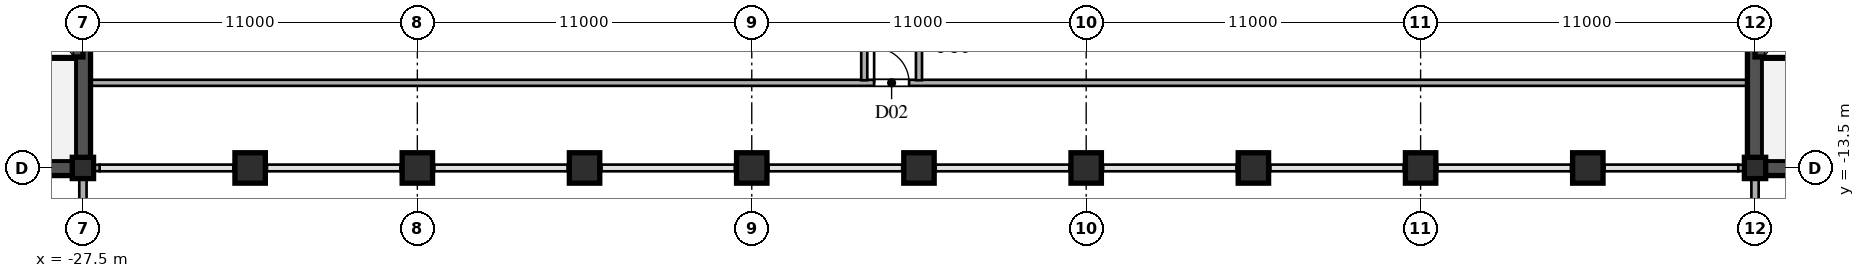
"""IFC4 building model, lengths in metres.
Left out: names, types, materials, properties, quantities, classifications, styles, units other than length and angle.
Written with IfcOpenShell. Run it as: python <this file> out.ifc"""

import sys

from ifc_helpers import new_model, si_unit, direction, frame, frame_2d, origin, origin_2d, place, context, subcontext, project, spatial, rectangle, hollow_rectangle, extrude, source, transform, mapped, element, fill, save


model = new_model("IFC4")
c1 = context("Model", 3, precision=1e-05, world=origin(), true_north=direction((0.0, 1.0)))
c2 = subcontext(c1, "Body", "Model", "MODEL_VIEW")
j1 = project(units=[si_unit("LENGTHUNIT", "METRE"), si_unit("PLANEANGLEUNIT", "RADIAN")], contexts=[c1])
p1 = place(None, origin())
s1 = spatial("IfcSite", under=j1, at=p1, CompositionType="ELEMENT")
p2 = place(p1, origin())
s2 = spatial("IfcBuilding", under=s1, at=p2, CompositionType="ELEMENT")
p3 = place(p2, frame((0.0, 0.0, 229.8)))
s3 = spatial("IfcBuildingStorey", under=s2, at=p3, CompositionType="ELEMENT", Elevation=229.8)
m1 = source(origin(), c2, "Body", "SweptSolid", [
    extrude(hollow_rectangle(XDim=0.7, YDim=0.7, WallThickness=0.03, at=origin_2d()), origin(), (0.0, 0.0, 1.0), 4.8),
])
for number, where, z_axis, x_axis in (
    (1, (-27.5, -13.5, 0.0), (0.0, 0.0, 1.0), (1.0, 0.0, 0.0)),
    (2, (27.5, -13.5, 0.0), (0.0, 0.0, 1.0), (1.0, 0.0, 0.0)),
):
    element("IfcColumn", number, at=place(p3, frame(where, z_axis=z_axis, x_axis=x_axis)), inside=s3, PredefinedType="COLUMN", context=c2, shape_type="MappedRepresentation", body=[
        mapped(m1, transform((0.0, 0.0, 0.0), scale=1.0)),
    ])
m2 = source(origin(), c2, "Body", "SweptSolid", [
    extrude(hollow_rectangle(XDim=1.0, YDim=1.0, WallThickness=0.042, at=origin_2d()), origin(), (0.0, 0.0, 1.0), 6.06),
])
for number, where, z_axis, x_axis in (
    (3, (-22.0, -13.5, -1.26), (0.0, 0.0, 1.0), (1.0, 0.0, 0.0)),
    (4, (-16.5, -13.5, -1.26), (0.0, 0.0, 1.0), (1.0, 0.0, 0.0)),
    (5, (-11.0, -13.5, -1.26), (0.0, 0.0, 1.0), (1.0, 0.0, 0.0)),
    (6, (-5.5, -13.5, -1.26), (0.0, 0.0, 1.0), (1.0, 0.0, 0.0)),
    (7, (0.0, -13.5, -1.26), (0.0, 0.0, 1.0), (1.0, 0.0, 0.0)),
    (8, (5.5, -13.5, -1.26), (0.0, 0.0, 1.0), (1.0, 0.0, 0.0)),
    (9, (11.0, -13.5, -1.26), (0.0, 0.0, 1.0), (1.0, 0.0, 0.0)),
    (10, (16.5, -13.5, -1.26), (0.0, 0.0, 1.0), (1.0, 0.0, 0.0)),
    (11, (22.0, -13.5, -1.26), (0.0, 0.0, 1.0), (1.0, 0.0, 0.0)),
):
    element("IfcColumn", number, at=place(p3, frame(where, z_axis=z_axis, x_axis=x_axis)), inside=s3, PredefinedType="COLUMN", context=c2, shape_type="MappedRepresentation", body=[
        mapped(m2, transform((0.0, 0.0, 0.0), scale=1.0)),
    ])
p4 = place(p3, frame((-27.5, -15.98, 0.0), z_axis=(0.0, 0.0, 1.0), x_axis=(0.0, 1.0, 0.0)))
e12 = element("IfcWall", 12, at=p4, inside=s3, PredefinedType="SOLIDWALL", context=c2, shape_type="SweptSolid", body=[
    extrude(rectangle(XDim=1.605, YDim=0.24, at=frame_2d((0.803, 0.0))), origin(), (0.0, 0.0, 1.0), 4.54),
])
p5 = place(p3, frame((-27.5, -14.375, 0.0), z_axis=(0.0, 0.0, 1.0), x_axis=(0.0, 1.0, 0.0)))
e13 = element("IfcWall", 13, at=p5, inside=s3, PredefinedType="SOLIDWALL", context=c2, shape_type="SweptSolid", body=[
    extrude(rectangle(XDim=0.62, YDim=0.24, at=frame_2d((0.31, 0.0))), origin(), (0.0, 0.0, 1.0), 4.04),
])
p6 = place(p3, frame((27.5, -15.98, 0.0), z_axis=(0.0, 0.0, 1.0), x_axis=(0.0, 1.0, 0.0)))
e14 = element("IfcWall", 14, at=p6, inside=s3, PredefinedType="SOLIDWALL", context=c2, shape_type="SweptSolid", body=[
    extrude(rectangle(XDim=1.605, YDim=0.24, at=frame_2d((0.803, 0.0))), origin(), (0.0, 0.0, 1.0), 4.54),
])
p7 = place(p3, frame((27.5, -14.375, 0.0), z_axis=(0.0, 0.0, 1.0), x_axis=(0.0, 1.0, 0.0)))
e15 = element("IfcWall", 15, at=p7, inside=s3, PredefinedType="SOLIDWALL", context=c2, shape_type="SweptSolid", body=[
    extrude(rectangle(XDim=0.62, YDim=0.24, at=frame_2d((0.31, 0.0))), origin(), (0.0, 0.0, 1.0), 4.04),
])
p8 = place(p3, frame((-27.49, -13.5, 0.0), z_axis=(0.0, 0.0, 1.0), x_axis=(1.0, 0.0, 0.0)))
e16 = element("IfcWall", 16, at=p8, inside=s3, PredefinedType="SOLIDWALL", context=c2, shape_type="SweptSolid", body=[
    extrude(rectangle(XDim=0.54, YDim=0.21, at=frame_2d((0.27, 0.0))), origin(), (0.0, 0.0, 1.0), 2.54),
])
for number, where, z_axis, x_axis in (
    (17, (-22.55, -13.5, 0.0), (0.0, 0.0, 1.0), (1.0, 0.0, 0.0)),
    (18, (-17.05, -13.5, 0.0), (0.0, 0.0, 1.0), (1.0, 0.0, 0.0)),
    (19, (-11.55, -13.5, 0.0), (0.0, 0.0, 1.0), (1.0, 0.0, 0.0)),
    (20, (-6.05, -13.5, 0.0), (0.0, 0.0, 1.0), (1.0, 0.0, 0.0)),
    (21, (-0.55, -13.5, 0.0), (0.0, 0.0, 1.0), (1.0, 0.0, 0.0)),
    (22, (4.95, -13.5, 0.0), (0.0, 0.0, 1.0), (1.0, 0.0, 0.0)),
    (23, (10.45, -13.5, 0.0), (0.0, 0.0, 1.0), (1.0, 0.0, 0.0)),
    (24, (15.95, -13.5, 0.0), (0.0, 0.0, 1.0), (1.0, 0.0, 0.0)),
    (25, (21.45, -13.5, 0.0), (0.0, 0.0, 1.0), (1.0, 0.0, 0.0)),
):
    element("IfcWall", number, at=place(p3, frame(where, z_axis=z_axis, x_axis=x_axis)), inside=s3, PredefinedType="SOLIDWALL", context=c2, shape_type="SweptSolid", body=[
        extrude(rectangle(XDim=1.1, YDim=0.21, at=frame_2d((0.55, 0.0))), origin(), (0.0, 0.0, 1.0), 2.54),
    ])
p9 = place(p3, frame((26.95, -13.5, 0.0), z_axis=(0.0, 0.0, 1.0), x_axis=(1.0, 0.0, 0.0)))
e26 = element("IfcWall", 26, at=p9, inside=s3, PredefinedType="SOLIDWALL", context=c2, shape_type="SweptSolid", body=[
    extrude(rectangle(XDim=0.54, YDim=0.21, at=frame_2d((0.27, 0.0))), origin(), (0.0, 0.0, 1.0), 2.54),
])
p10 = place(p3, frame((-27.5, -13.5, 0.0), z_axis=(0.0, 0.0, 1.0), x_axis=(0.0, 1.0, 0.0)))
e27 = element("IfcWall", 27, at=p10, inside=s3, PredefinedType="SHEAR", context=c2, shape_type="SweptSolid", body=[
    extrude(rectangle(XDim=12.2, YDim=0.5, at=frame_2d((6.1, 0.0))), origin(), (0.0, 0.0, 1.0), 4.54),
])
p11 = place(p3, frame((-36.5, -13.5, 0.0), z_axis=(0.0, 0.0, 1.0), x_axis=(1.0, 0.0, 0.0)))
e28 = element("IfcWall", 28, at=p11, inside=s3, PredefinedType="SHEAR", context=c2, shape_type="SweptSolid", body=[
    extrude(rectangle(XDim=9.0, YDim=0.5, at=frame_2d((4.5, 0.0))), origin(), (0.0, 0.0, 1.0), 4.54),
])
p12 = place(p3, frame((-36.5, -9.7, 0.0), z_axis=(0.0, 0.0, 1.0), x_axis=(1.0, 0.0, 0.0)))
e29 = element("IfcWall", 29, at=p12, inside=s3, PredefinedType="SHEAR", context=c2, shape_type="SweptSolid", body=[
    extrude(rectangle(XDim=9.0, YDim=0.3, at=frame_2d((4.5, 0.0))), origin(), (0.0, 0.0, 1.0), 4.54),
])
p13 = place(p12, frame((0.6, 0.0, 0.0)))
e30 = element("IfcOpeningElement", 30, at=p13, cuts=e29, PredefinedType="OPENING", context=c2, shape_type="SweptSolid", body=[
    extrude(rectangle(XDim=1.1, YDim=2.2, at=frame_2d((0.55, 1.1))), frame((0.0, 0.16, 0.0), z_axis=(0.0, -1.0, 0.0), x_axis=(1.0, 0.0, 0.0)), (0.0, 0.0, 1.0), 0.32),
])
p14 = place(p3, frame((27.5, -13.5, 0.0), z_axis=(0.0, 0.0, 1.0), x_axis=(0.0, 1.0, 0.0)))
e31 = element("IfcWall", 31, at=p14, inside=s3, PredefinedType="SHEAR", context=c2, shape_type="SweptSolid", body=[
    extrude(rectangle(XDim=12.2, YDim=0.5, at=frame_2d((6.1, 0.0))), origin(), (0.0, 0.0, 1.0), 4.54),
])
p15 = place(p3, frame((27.5, -13.5, 0.0), z_axis=(0.0, 0.0, 1.0), x_axis=(1.0, 0.0, 0.0)))
e32 = element("IfcWall", 32, at=p15, inside=s3, PredefinedType="SHEAR", context=c2, shape_type="SweptSolid", body=[
    extrude(rectangle(XDim=9.0, YDim=0.5, at=frame_2d((4.5, 0.0))), origin(), (0.0, 0.0, 1.0), 4.54),
])
p16 = place(p3, frame((27.5, -9.7, 0.0), z_axis=(0.0, 0.0, 1.0), x_axis=(1.0, 0.0, 0.0)))
e33 = element("IfcWall", 33, at=p16, inside=s3, PredefinedType="SHEAR", context=c2, shape_type="SweptSolid", body=[
    extrude(rectangle(XDim=9.0, YDim=0.3, at=frame_2d((4.5, 0.0))), origin(), (0.0, 0.0, 1.0), 4.54),
])
p17 = place(p16, frame((7.3, 0.0, 0.0)))
e34 = element("IfcOpeningElement", 34, at=p17, cuts=e33, PredefinedType="OPENING", context=c2, shape_type="SweptSolid", body=[
    extrude(rectangle(XDim=1.1, YDim=2.2, at=frame_2d((0.55, 1.1))), frame((0.0, 0.16, 0.0), z_axis=(0.0, -1.0, 0.0), x_axis=(1.0, 0.0, 0.0)), (0.0, 0.0, 1.0), 0.32),
])
p18 = place(p3, frame((-27.245, -10.7, 0.0), z_axis=(0.0, 0.0, 1.0), x_axis=(1.0, 0.0, 0.0)))
e35 = element("IfcWall", 35, at=p18, inside=s3, PredefinedType="PARTITIONING", context=c2, shape_type="SweptSolid", body=[
    extrude(rectangle(XDim=54.49, YDim=0.2, at=frame_2d((27.245, 0.0))), origin(), (0.0, 0.0, 1.0), 4.54),
])
p19 = place(p18, frame((25.77, 0.0, 0.0)))
e36 = element("IfcOpeningElement", 36, at=p19, cuts=e35, PredefinedType="OPENING", context=c2, shape_type="SweptSolid", body=[
    extrude(rectangle(XDim=1.15, YDim=2.2, at=frame_2d((0.575, 1.1))), frame((0.0, 0.11, 0.0), z_axis=(0.0, -1.0, 0.0), x_axis=(1.0, 0.0, 0.0)), (0.0, 0.0, 1.0), 0.22),
])
p20 = place(p3, frame((-1.8, -10.615, 0.0), z_axis=(0.0, 0.0, 1.0), x_axis=(0.0, 1.0, 0.0)))
e37 = element("IfcWall", 37, at=p20, inside=s3, PredefinedType="PARTITIONING", context=c2, shape_type="SweptSolid", body=[
    extrude(rectangle(XDim=9.13, YDim=0.2, at=frame_2d((4.565, 0.0))), origin(), (0.0, 0.0, 1.0), 4.54),
])
p21 = place(p3, frame((0.0, -10.615, 0.0), z_axis=(0.0, 0.0, 1.0), x_axis=(0.0, 1.0, 0.0)))
e38 = element("IfcWall", 38, at=p21, inside=s3, PredefinedType="PARTITIONING", context=c2, shape_type="SweptSolid", body=[
    extrude(rectangle(XDim=7.635, YDim=0.2, at=frame_2d((3.817, 0.0))), origin(), (0.0, 0.0, 1.0), 3.44),
])
m3 = source(origin(), c2, "Body", "SweptSolid", [
    extrude(rectangle(XDim=1.15, YDim=2.2, at=frame_2d((0.575, 1.1))), frame((0.0, 0.025, 0.0), z_axis=(0.0, -1.0, 0.0), x_axis=(1.0, 0.0, 0.0)), (0.0, 0.0, 1.0), 0.05),
])
p22 = place(p19, origin())
e39 = element("IfcDoor", 39, at=p22, inside=s3, OperationType="SINGLE_SWING_LEFT", PredefinedType="DOOR", context=c2, shape_type="MappedRepresentation", body=[
    mapped(m3, transform((0.0, 0.0, 0.0), scale=1.0)),
])
fill(e36, e39)
save(model, sys.argv[1])
